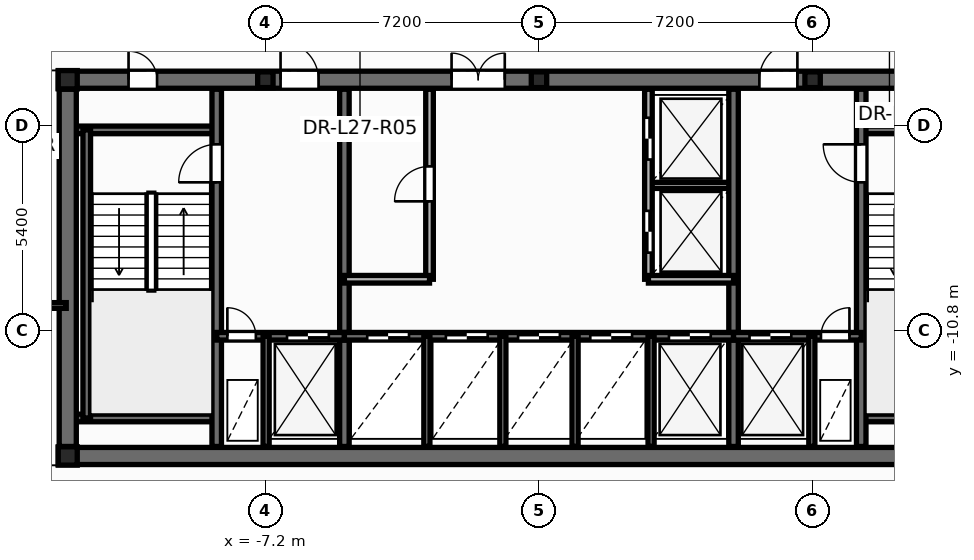
"""IFC4 building model, lengths in metres.
Left out: names, types, materials, properties, quantities, classifications, styles, units other than length and angle.
Written with IfcOpenShell. Run it as: python <this file> out.ifc"""

import sys

from ifc_helpers import new_model, si_unit, direction, frame, frame_2d, origin, origin_2d, place, context, subcontext, project, spatial, rectangle, i_section, extrude, element, fill, save


model = new_model("IFC4")
c1 = context("Model", 3, precision=1e-05, world=origin(), true_north=direction((0.0, 1.0)))
c2 = subcontext(c1, "Body", "Model", "MODEL_VIEW")
j1 = project(units=[si_unit("LENGTHUNIT", "METRE"), si_unit("PLANEANGLEUNIT", "RADIAN")], contexts=[c1])
p1 = place(None, origin())
s1 = spatial("IfcSite", under=j1, at=p1, CompositionType="ELEMENT")
p2 = place(p1, origin())
s2 = spatial("IfcBuilding", under=s1, at=p2, CompositionType="ELEMENT")
p3 = place(p2, frame((0.0, 0.0, 106.8)))
s3 = spatial("IfcBuildingStorey", under=s2, at=p3, CompositionType="ELEMENT", Elevation=106.8)
for number, where, z_axis, x_axis in (
    (1, (-12.4, -14.1, 0.0), (0.0, 0.0, 1.0), (1.0, 0.0, 0.0)),
    (2, (-12.4, -4.2, 0.0), (0.0, 0.0, 1.0), (1.0, 0.0, 0.0)),
):
    element("IfcColumn", number, at=place(p3, frame(where, z_axis=z_axis, x_axis=x_axis)), inside=s3, PredefinedType="COLUMN", context=c2, shape_type="SweptSolid", body=[
        extrude(i_section(OverallWidth=0.5, OverallDepth=0.482, WebThickness=0.04, FlangeThickness=0.045, at=origin_2d()), origin(), (0.0, 0.0, 1.0), 3.6),
    ])
for number, where, z_axis, x_axis in (
    (3, (-7.2, -4.2, 0.0), (0.0, 0.0, 1.0), (1.0, 0.0, 0.0)),
    (4, (0.0, -4.2, 0.0), (0.0, 0.0, 1.0), (1.0, 0.0, 0.0)),
    (5, (7.2, -4.2, 0.0), (0.0, 0.0, 1.0), (1.0, 0.0, 0.0)),
):
    element("IfcColumn", number, at=place(p3, frame(where, z_axis=z_axis, x_axis=x_axis)), inside=s3, PredefinedType="PILASTER", context=c2, shape_type="SweptSolid", body=[
        extrude(i_section(OverallWidth=0.405, OverallDepth=0.414, WebThickness=0.022, FlangeThickness=0.032, at=origin_2d()), origin(), (0.0, 0.0, 1.0), 3.6),
    ])
p4 = place(p3, frame((2.88, -6.98, 0.0), z_axis=(0.0, 0.0, 1.0), x_axis=(1.0, 0.0, 0.0)))
e6 = element("IfcWall", 6, at=p4, inside=s3, PredefinedType="PARTITIONING", context=c2, shape_type="SweptSolid", body=[
    extrude(rectangle(XDim=2.24, YDim=0.16, at=frame_2d((1.12, 0.0))), origin(), (0.0, 0.0, 1.0), 3.35),
])
p5 = place(p3, frame((-12.65, -14.1, 0.0), z_axis=(0.0, 0.0, 1.0), x_axis=(1.0, 0.0, 0.0)))
e7 = element("IfcWall", 7, at=p5, inside=s3, PredefinedType="SHEAR", context=c2, shape_type="SweptSolid", body=[
    extrude(rectangle(XDim=25.3, YDim=0.45, at=frame_2d((12.65, 0.0))), origin(), (0.0, 0.0, 1.0), 3.6),
])
p6 = place(p3, frame((-12.65, -4.2, 0.0), z_axis=(0.0, 0.0, 1.0), x_axis=(1.0, 0.0, 0.0)))
e8 = element("IfcWall", 8, at=p6, inside=s3, PredefinedType="SHEAR", context=c2, shape_type="SweptSolid", body=[
    extrude(rectangle(XDim=25.3, YDim=0.45, at=frame_2d((12.65, 0.0))), origin(), (0.0, 0.0, 1.0), 3.6),
])
p7 = place(p6, frame((1.85, 0.0, 0.0)))
e9 = element("IfcOpeningElement", 9, at=p7, cuts=e8, PredefinedType="OPENING", context=c2, shape_type="SweptSolid", body=[
    extrude(rectangle(XDim=0.756, YDim=2.054, at=frame_2d((0.375, 1.027))), frame((0.0, 0.235, 0.0), z_axis=(0.0, -1.0, 0.0), x_axis=(1.0, 0.0, 0.0)), (0.0, 0.0, 1.0), 0.47),
])
p8 = place(p6, frame((22.65, 0.0, 0.0)))
e10 = element("IfcOpeningElement", 10, at=p8, cuts=e8, PredefinedType="OPENING", context=c2, shape_type="SweptSolid", body=[
    extrude(rectangle(XDim=0.756, YDim=2.054, at=frame_2d((0.375, 1.027))), frame((0.0, 0.235, 0.0), z_axis=(0.0, -1.0, 0.0), x_axis=(1.0, 0.0, 0.0)), (0.0, 0.0, 1.0), 0.47),
])
p9 = place(p6, frame((5.85, 0.0, 0.0)))
e11 = element("IfcOpeningElement", 11, at=p9, cuts=e8, PredefinedType="OPENING", context=c2, shape_type="SweptSolid", body=[
    extrude(rectangle(XDim=1.006, YDim=2.104, at=frame_2d((0.5, 1.052))), frame((0.0, 0.235, 0.0), z_axis=(0.0, -1.0, 0.0), x_axis=(1.0, 0.0, 0.0)), (0.0, 0.0, 1.0), 0.47),
])
p10 = place(p6, frame((10.35, 0.0, 0.0)))
e12 = element("IfcOpeningElement", 12, at=p10, cuts=e8, PredefinedType="OPENING", context=c2, shape_type="SweptSolid", body=[
    extrude(rectangle(XDim=1.406, YDim=2.154, at=frame_2d((0.7, 1.077))), frame((0.0, 0.235, 0.0), z_axis=(0.0, -1.0, 0.0), x_axis=(1.0, 0.0, 0.0)), (0.0, 0.0, 1.0), 0.47),
])
p11 = place(p6, frame((18.45, 0.0, 0.0)))
e13 = element("IfcOpeningElement", 13, at=p11, cuts=e8, PredefinedType="OPENING", context=c2, shape_type="SweptSolid", body=[
    extrude(rectangle(XDim=1.006, YDim=2.104, at=frame_2d((0.5, 1.052))), frame((0.0, 0.235, 0.0), z_axis=(0.0, -1.0, 0.0), x_axis=(1.0, 0.0, 0.0)), (0.0, 0.0, 1.0), 0.47),
])
for number, where, z_axis, x_axis in (
    (14, (-12.35, -5.52, 0.0), (0.0, 0.0, 1.0), (1.0, 0.0, 0.0)),
    (15, (-12.35, -13.1, 0.0), (0.0, 0.0, 1.0), (1.0, 0.0, 0.0)),
):
    element("IfcWall", number, at=place(p3, frame(where, z_axis=z_axis, x_axis=x_axis)), inside=s3, PredefinedType="SOLIDWALL", context=c2, shape_type="SweptSolid", body=[
        extrude(rectangle(XDim=3.87, YDim=0.2, at=frame_2d((1.935, 0.0))), origin(), (0.0, 0.0, 1.0), 3.6),
    ])
p12 = place(p3, frame((-11.9, -13.1, 0.0), z_axis=(0.0, 0.0, 1.0), x_axis=(0.0, 1.0, 0.0)))
e16 = element("IfcWall", 16, at=p12, inside=s3, PredefinedType="SOLIDWALL", context=c2, shape_type="SweptSolid", body=[
    extrude(rectangle(XDim=7.58, YDim=0.2, at=frame_2d((3.79, 0.0))), origin(), (0.0, 0.0, 1.0), 3.6),
])
for number, where, z_axis, x_axis in (
    (17, (8.48, -5.52, 0.0), (0.0, 0.0, 1.0), (1.0, 0.0, 0.0)),
    (18, (8.48, -13.1, 0.0), (0.0, 0.0, 1.0), (1.0, 0.0, 0.0)),
):
    element("IfcWall", number, at=place(p3, frame(where, z_axis=z_axis, x_axis=x_axis)), inside=s3, PredefinedType="SOLIDWALL", context=c2, shape_type="SweptSolid", body=[
        extrude(rectangle(XDim=3.87, YDim=0.2, at=frame_2d((1.935, 0.0))), origin(), (0.0, 0.0, 1.0), 3.6),
    ])
p13 = place(p3, frame((-8.48, -13.85, 0.0), z_axis=(0.0, 0.0, 1.0), x_axis=(0.0, 1.0, 0.0)))
e19 = element("IfcWall", 19, at=p13, inside=s3, PredefinedType="SHEAR", context=c2, shape_type="SweptSolid", body=[
    extrude(rectangle(XDim=9.4, YDim=0.25, at=frame_2d((4.7, 0.0))), origin(), (0.0, 0.0, 1.0), 3.6),
])
p14 = place(p13, frame((6.95, 0.0, 0.0)))
e20 = element("IfcOpeningElement", 20, at=p14, cuts=e19, PredefinedType="OPENING", context=c2, shape_type="SweptSolid", body=[
    extrude(rectangle(XDim=1.006, YDim=2.104, at=frame_2d((0.5, 1.052))), frame((0.0, 0.135, 0.0), z_axis=(0.0, -1.0, 0.0), x_axis=(1.0, 0.0, 0.0)), (0.0, 0.0, 1.0), 0.27),
])
p15 = place(p3, frame((8.48, -13.85, 0.0), z_axis=(0.0, 0.0, 1.0), x_axis=(0.0, 1.0, 0.0)))
e21 = element("IfcWall", 21, at=p15, inside=s3, PredefinedType="SHEAR", context=c2, shape_type="SweptSolid", body=[
    extrude(rectangle(XDim=9.4, YDim=0.25, at=frame_2d((4.7, 0.0))), origin(), (0.0, 0.0, 1.0), 3.6),
])
p16 = place(p15, frame((6.95, 0.0, 0.0)))
e22 = element("IfcOpeningElement", 22, at=p16, cuts=e21, PredefinedType="OPENING", context=c2, shape_type="SweptSolid", body=[
    extrude(rectangle(XDim=1.006, YDim=2.104, at=frame_2d((0.5, 1.052))), frame((0.0, 0.135, 0.0), z_axis=(0.0, -1.0, 0.0), x_axis=(1.0, 0.0, 0.0)), (0.0, 0.0, 1.0), 0.27),
])
for number, where, z_axis, x_axis in (
    (23, (-5.12, -13.85, 0.0), (0.0, 0.0, 1.0), (0.0, 1.0, 0.0)),
    (24, (5.12, -13.85, 0.0), (0.0, 0.0, 1.0), (0.0, 1.0, 0.0)),
):
    element("IfcWall", number, at=place(p3, frame(where, z_axis=z_axis, x_axis=x_axis)), inside=s3, PredefinedType="SHEAR", context=c2, shape_type="SweptSolid", body=[
        extrude(rectangle(XDim=9.4, YDim=0.25, at=frame_2d((4.7, 0.0))), origin(), (0.0, 0.0, 1.0), 3.6),
    ])
p17 = place(p3, frame((-8.48, -10.95, 0.0), z_axis=(0.0, 0.0, 1.0), x_axis=(1.0, 0.0, 0.0)))
e25 = element("IfcWall", 25, at=p17, inside=s3, PredefinedType="SOLIDWALL", context=c2, shape_type="SweptSolid", body=[
    extrude(rectangle(XDim=3.36, YDim=0.2, at=frame_2d((1.68, 0.0))), origin(), (0.0, 0.0, 1.0), 3.6),
])
p18 = place(p17, frame((0.28, 0.0, 0.0)))
e26 = element("IfcOpeningElement", 26, at=p18, cuts=e25, PredefinedType="OPENING", context=c2, shape_type="SweptSolid", body=[
    extrude(rectangle(XDim=0.756, YDim=2.054, at=frame_2d((0.375, 1.027))), frame((0.0, 0.11, 0.0), z_axis=(0.0, -1.0, 0.0), x_axis=(1.0, 0.0, 0.0)), (0.0, 0.0, 1.0), 0.22),
])
p19 = place(p17, frame((1.85, 0.0, 0.0)))
e27 = element("IfcOpeningElement", 27, at=p19, cuts=e25, PredefinedType="OPENING", context=c2, shape_type="SweptSolid", body=[
    extrude(rectangle(XDim=1.106, YDim=2.104, at=frame_2d((0.55, 1.052))), frame((0.0, 0.11, 0.0), z_axis=(0.0, -1.0, 0.0), x_axis=(1.0, 0.0, 0.0)), (0.0, 0.0, 1.0), 0.22),
])
p20 = place(p3, frame((-5.12, -10.95, 0.0), z_axis=(0.0, 0.0, 1.0), x_axis=(1.0, 0.0, 0.0)))
e28 = element("IfcWall", 28, at=p20, inside=s3, PredefinedType="SOLIDWALL", context=c2, shape_type="SweptSolid", body=[
    extrude(rectangle(XDim=10.24, YDim=0.2, at=frame_2d((5.12, 0.0))), origin(), (0.0, 0.0, 1.0), 3.6),
])
p21 = place(p20, frame((0.6, 0.0, 0.0)))
e29 = element("IfcOpeningElement", 29, at=p21, cuts=e28, PredefinedType="OPENING", context=c2, shape_type="SweptSolid", body=[
    extrude(rectangle(XDim=1.106, YDim=2.104, at=frame_2d((0.55, 1.052))), frame((0.0, 0.11, 0.0), z_axis=(0.0, -1.0, 0.0), x_axis=(1.0, 0.0, 0.0)), (0.0, 0.0, 1.0), 0.22),
])
p22 = place(p20, frame((2.67, 0.0, 0.0)))
e30 = element("IfcOpeningElement", 30, at=p22, cuts=e28, PredefinedType="OPENING", context=c2, shape_type="SweptSolid", body=[
    extrude(rectangle(XDim=1.106, YDim=2.104, at=frame_2d((0.55, 1.052))), frame((0.0, 0.11, 0.0), z_axis=(0.0, -1.0, 0.0), x_axis=(1.0, 0.0, 0.0)), (0.0, 0.0, 1.0), 0.22),
])
p23 = place(p20, frame((4.57, 0.0, 0.0)))
e31 = element("IfcOpeningElement", 31, at=p23, cuts=e28, PredefinedType="OPENING", context=c2, shape_type="SweptSolid", body=[
    extrude(rectangle(XDim=1.106, YDim=2.104, at=frame_2d((0.55, 1.052))), frame((0.0, 0.11, 0.0), z_axis=(0.0, -1.0, 0.0), x_axis=(1.0, 0.0, 0.0)), (0.0, 0.0, 1.0), 0.22),
])
p24 = place(p20, frame((6.47, 0.0, 0.0)))
e32 = element("IfcOpeningElement", 32, at=p24, cuts=e28, PredefinedType="OPENING", context=c2, shape_type="SweptSolid", body=[
    extrude(rectangle(XDim=1.106, YDim=2.104, at=frame_2d((0.55, 1.052))), frame((0.0, 0.11, 0.0), z_axis=(0.0, -1.0, 0.0), x_axis=(1.0, 0.0, 0.0)), (0.0, 0.0, 1.0), 0.22),
])
p25 = place(p20, frame((8.54, 0.0, 0.0)))
e33 = element("IfcOpeningElement", 33, at=p25, cuts=e28, PredefinedType="OPENING", context=c2, shape_type="SweptSolid", body=[
    extrude(rectangle(XDim=1.106, YDim=2.104, at=frame_2d((0.55, 1.052))), frame((0.0, 0.11, 0.0), z_axis=(0.0, -1.0, 0.0), x_axis=(1.0, 0.0, 0.0)), (0.0, 0.0, 1.0), 0.22),
])
p26 = place(p3, frame((5.12, -10.95, 0.0), z_axis=(0.0, 0.0, 1.0), x_axis=(1.0, 0.0, 0.0)))
e34 = element("IfcWall", 34, at=p26, inside=s3, PredefinedType="SOLIDWALL", context=c2, shape_type="SweptSolid", body=[
    extrude(rectangle(XDim=3.36, YDim=0.2, at=frame_2d((1.68, 0.0))), origin(), (0.0, 0.0, 1.0), 3.6),
])
p27 = place(p26, frame((0.42, 0.0, 0.0)))
e35 = element("IfcOpeningElement", 35, at=p27, cuts=e34, PredefinedType="OPENING", context=c2, shape_type="SweptSolid", body=[
    extrude(rectangle(XDim=1.106, YDim=2.104, at=frame_2d((0.55, 1.052))), frame((0.0, 0.11, 0.0), z_axis=(0.0, -1.0, 0.0), x_axis=(1.0, 0.0, 0.0)), (0.0, 0.0, 1.0), 0.22),
])
p28 = place(p26, frame((2.3, 0.0, 0.0)))
e36 = element("IfcOpeningElement", 36, at=p28, cuts=e34, PredefinedType="OPENING", context=c2, shape_type="SweptSolid", body=[
    extrude(rectangle(XDim=0.756, YDim=2.054, at=frame_2d((0.375, 1.027))), frame((0.0, 0.11, 0.0), z_axis=(0.0, -1.0, 0.0), x_axis=(1.0, 0.0, 0.0)), (0.0, 0.0, 1.0), 0.22),
])
for number, where, z_axis, x_axis in (
    (37, (-7.18, -13.85, 0.0), (0.0, 0.0, 1.0), (0.0, 1.0, 0.0)),
    (38, (7.18, -13.85, 0.0), (0.0, 0.0, 1.0), (0.0, 1.0, 0.0)),
    (39, (-2.95, -13.85, 0.0), (0.0, 0.0, 1.0), (0.0, 1.0, 0.0)),
    (40, (2.95, -13.85, 0.0), (0.0, 0.0, 1.0), (0.0, 1.0, 0.0)),
):
    element("IfcWall", number, at=place(p3, frame(where, z_axis=z_axis, x_axis=x_axis)), inside=s3, PredefinedType="PARTITIONING", context=c2, shape_type="SweptSolid", body=[
        extrude(rectangle(XDim=2.9, YDim=0.16, at=frame_2d((1.45, 0.0))), origin(), (0.0, 0.0, 1.0), 2.375),
    ])
p29 = place(p3, frame((-12.4, -13.85, 0.0), z_axis=(0.0, 0.0, 1.0), x_axis=(0.0, 1.0, 0.0)))
e41 = element("IfcWall", 41, at=p29, inside=s3, PredefinedType="SHEAR", context=c2, shape_type="SweptSolid", body=[
    extrude(rectangle(XDim=9.4, YDim=0.45, at=frame_2d((4.7, 0.0))), origin(), (0.0, 0.0, 1.0), 3.6),
])
p30 = place(p3, frame((-2.88, -9.45, 0.0), z_axis=(0.0, 0.0, 1.0), x_axis=(0.0, 1.0, 0.0)))
e42 = element("IfcWall", 42, at=p30, inside=s3, PredefinedType="SOLIDWALL", context=c2, shape_type="SweptSolid", body=[
    extrude(rectangle(XDim=5.0, YDim=0.2, at=frame_2d((2.5, 0.0))), origin(), (0.0, 0.0, 1.0), 3.35),
])
p31 = place(p30, frame((2.05, 0.0, 0.0)))
e43 = element("IfcOpeningElement", 43, at=p31, cuts=e42, PredefinedType="OPENING", context=c2, shape_type="SweptSolid", body=[
    extrude(rectangle(XDim=0.926, YDim=2.104, at=frame_2d((0.46, 1.052))), frame((0.0, 0.11, 0.0), z_axis=(0.0, -1.0, 0.0), x_axis=(1.0, 0.0, 0.0)), (0.0, 0.0, 1.0), 0.22),
])
p32 = place(p3, frame((-5.12, -9.45, 0.0), z_axis=(0.0, 0.0, 1.0), x_axis=(1.0, 0.0, 0.0)))
e44 = element("IfcWall", 44, at=p32, inside=s3, PredefinedType="SOLIDWALL", context=c2, shape_type="SweptSolid", body=[
    extrude(rectangle(XDim=2.24, YDim=0.2, at=frame_2d((1.12, 0.0))), origin(), (0.0, 0.0, 1.0), 3.35),
])
p33 = place(p3, frame((2.88, -9.45, 0.0), z_axis=(0.0, 0.0, 1.0), x_axis=(0.0, 1.0, 0.0)))
e45 = element("IfcWall", 45, at=p33, inside=s3, PredefinedType="SOLIDWALL", context=c2, shape_type="SweptSolid", body=[
    extrude(rectangle(XDim=5.0, YDim=0.2, at=frame_2d((2.5, 0.0))), origin(), (0.0, 0.0, 1.0), 3.35),
])
p34 = place(p33, frame((0.7, 0.0, 0.0)))
e46 = element("IfcOpeningElement", 46, at=p34, cuts=e45, PredefinedType="OPENING", context=c2, shape_type="SweptSolid", body=[
    extrude(rectangle(XDim=1.106, YDim=2.104, at=frame_2d((0.55, 1.052))), frame((0.0, 0.11, 0.0), z_axis=(0.0, -1.0, 0.0), x_axis=(1.0, 0.0, 0.0)), (0.0, 0.0, 1.0), 0.22),
])
p35 = place(p33, frame((3.15, 0.0, 0.0)))
e47 = element("IfcOpeningElement", 47, at=p35, cuts=e45, PredefinedType="OPENING", context=c2, shape_type="SweptSolid", body=[
    extrude(rectangle(XDim=1.106, YDim=2.104, at=frame_2d((0.55, 1.052))), frame((0.0, 0.11, 0.0), z_axis=(0.0, -1.0, 0.0), x_axis=(1.0, 0.0, 0.0)), (0.0, 0.0, 1.0), 0.22),
])
p36 = place(p3, frame((2.88, -9.45, 0.0), z_axis=(0.0, 0.0, 1.0), x_axis=(1.0, 0.0, 0.0)))
e48 = element("IfcWall", 48, at=p36, inside=s3, PredefinedType="SOLIDWALL", context=c2, shape_type="SweptSolid", body=[
    extrude(rectangle(XDim=2.24, YDim=0.2, at=frame_2d((1.12, 0.0))), origin(), (0.0, 0.0, 1.0), 3.35),
])
for number, where, z_axis, x_axis in (
    (49, (-0.95, -13.85, 0.0), (0.0, 0.0, 1.0), (0.0, 1.0, 0.0)),
    (50, (0.95, -13.85, 0.0), (0.0, 0.0, 1.0), (0.0, 1.0, 0.0)),
):
    element("IfcWall", number, at=place(p3, frame(where, z_axis=z_axis, x_axis=x_axis)), inside=s3, PredefinedType="PARTITIONING", context=c2, shape_type="SweptSolid", body=[
        extrude(rectangle(XDim=2.9, YDim=0.16, at=frame_2d((1.45, 0.0))), origin(), (0.0, 0.0, 1.0), 2.375),
    ])
p37 = place(p3, frame((-21.822, -10.14, 0.0), z_axis=(0.0, 0.0, 1.0), x_axis=(1.0, 0.0, 0.0)))
e51 = element("IfcWall", 51, at=p37, inside=s3, PredefinedType="PARTITIONING", context=c2, shape_type="SweptSolid", body=[
    extrude(rectangle(XDim=9.382, YDim=0.15, at=frame_2d((4.691, 0.0))), origin(), (0.0, 0.0, 1.0), 2.713),
])
p38 = place(p37, frame((2.17, 0.0, 0.0)))
e52 = element("IfcOpeningElement", 52, at=p38, cuts=e51, PredefinedType="OPENING", context=c2, shape_type="SweptSolid", body=[
    extrude(rectangle(XDim=0.906, YDim=2.104, at=frame_2d((0.45, 1.052))), frame((0.0, 0.085, 0.0), z_axis=(0.0, -1.0, 0.0), x_axis=(1.0, 0.0, 0.0)), (0.0, 0.0, 1.0), 0.17),
])
p39 = place(p31, origin())
e53 = element("IfcDoor", 53, at=p39, inside=s3, OperationType="SINGLE_SWING_LEFT", PredefinedType="DOOR", context=c2, shape_type="SweptSolid", body=[
    extrude(rectangle(XDim=0.92, YDim=2.1, at=frame_2d((0.46, 1.05))), frame((0.0, 0.025, 0.0), z_axis=(0.0, -1.0, 0.0), x_axis=(1.0, 0.0, 0.0)), (0.0, 0.0, 1.0), 0.05),
])
fill(e43, e53)
p40 = place(p34, origin())
e54 = element("IfcDoor", 54, at=p40, inside=s3, OperationType="DOUBLE_DOOR_SLIDING", PredefinedType="DOOR", context=c2, shape_type="SweptSolid", body=[
    extrude(rectangle(XDim=1.1, YDim=2.1, at=frame_2d((0.55, 1.05))), frame((0.0, 0.025, 0.0), z_axis=(0.0, -1.0, 0.0), x_axis=(1.0, 0.0, 0.0)), (0.0, 0.0, 1.0), 0.05),
])
fill(e46, e54)
p41 = place(p35, origin())
e55 = element("IfcDoor", 55, at=p41, inside=s3, OperationType="DOUBLE_DOOR_SLIDING", PredefinedType="DOOR", context=c2, shape_type="SweptSolid", body=[
    extrude(rectangle(XDim=1.1, YDim=2.1, at=frame_2d((0.55, 1.05))), frame((0.0, 0.025, 0.0), z_axis=(0.0, -1.0, 0.0), x_axis=(1.0, 0.0, 0.0)), (0.0, 0.0, 1.0), 0.05),
])
fill(e47, e55)
p42 = place(p14, origin())
e56 = element("IfcDoor", 56, at=p42, inside=s3, OperationType="SINGLE_SWING_LEFT", PredefinedType="DOOR", context=c2, shape_type="SweptSolid", body=[
    extrude(rectangle(XDim=1.0, YDim=2.1, at=frame_2d((0.5, 1.05))), frame((0.0, 0.025, 0.0), z_axis=(0.0, -1.0, 0.0), x_axis=(1.0, 0.0, 0.0)), (0.0, 0.0, 1.0), 0.05),
])
fill(e20, e56)
p43 = place(p16, origin())
e57 = element("IfcDoor", 57, at=p43, inside=s3, OperationType="SINGLE_SWING_RIGHT", PredefinedType="DOOR", context=c2, shape_type="SweptSolid", body=[
    extrude(rectangle(XDim=1.0, YDim=2.1, at=frame_2d((0.5, 1.05))), frame((0.0, 0.025, 0.0), z_axis=(0.0, -1.0, 0.0), x_axis=(1.0, 0.0, 0.0)), (0.0, 0.0, 1.0), 0.05),
])
fill(e22, e57)
p44 = place(p18, origin())
e58 = element("IfcDoor", 58, at=p44, inside=s3, OperationType="SINGLE_SWING_LEFT", PredefinedType="DOOR", context=c2, shape_type="SweptSolid", body=[
    extrude(rectangle(XDim=0.75, YDim=2.05, at=frame_2d((0.375, 1.025))), frame((0.0, 0.025, 0.0), z_axis=(0.0, -1.0, 0.0), x_axis=(1.0, 0.0, 0.0)), (0.0, 0.0, 1.0), 0.05),
])
fill(e26, e58)
p45 = place(p19, origin())
e59 = element("IfcDoor", 59, at=p45, inside=s3, OperationType="DOUBLE_DOOR_SLIDING", PredefinedType="DOOR", context=c2, shape_type="SweptSolid", body=[
    extrude(rectangle(XDim=1.1, YDim=2.1, at=frame_2d((0.55, 1.05))), frame((0.0, 0.025, 0.0), z_axis=(0.0, -1.0, 0.0), x_axis=(1.0, 0.0, 0.0)), (0.0, 0.0, 1.0), 0.05),
])
fill(e27, e59)
p46 = place(p27, origin())
e60 = element("IfcDoor", 60, at=p46, inside=s3, OperationType="DOUBLE_DOOR_SLIDING", PredefinedType="DOOR", context=c2, shape_type="SweptSolid", body=[
    extrude(rectangle(XDim=1.1, YDim=2.1, at=frame_2d((0.55, 1.05))), frame((0.0, 0.025, 0.0), z_axis=(0.0, -1.0, 0.0), x_axis=(1.0, 0.0, 0.0)), (0.0, 0.0, 1.0), 0.05),
])
fill(e35, e60)
p47 = place(p28, origin())
e61 = element("IfcDoor", 61, at=p47, inside=s3, OperationType="SINGLE_SWING_RIGHT", PredefinedType="DOOR", context=c2, shape_type="SweptSolid", body=[
    extrude(rectangle(XDim=0.75, YDim=2.05, at=frame_2d((0.375, 1.025))), frame((0.0, 0.025, 0.0), z_axis=(0.0, -1.0, 0.0), x_axis=(1.0, 0.0, 0.0)), (0.0, 0.0, 1.0), 0.05),
])
fill(e36, e61)
p48 = place(p21, origin())
e62 = element("IfcDoor", 62, at=p48, inside=s3, OperationType="DOUBLE_DOOR_SLIDING", PredefinedType="DOOR", context=c2, shape_type="SweptSolid", body=[
    extrude(rectangle(XDim=1.1, YDim=2.1, at=frame_2d((0.55, 1.05))), frame((0.0, 0.025, 0.0), z_axis=(0.0, -1.0, 0.0), x_axis=(1.0, 0.0, 0.0)), (0.0, 0.0, 1.0), 0.05),
])
fill(e29, e62)
p49 = place(p22, origin())
e63 = element("IfcDoor", 63, at=p49, inside=s3, OperationType="DOUBLE_DOOR_SLIDING", PredefinedType="DOOR", context=c2, shape_type="SweptSolid", body=[
    extrude(rectangle(XDim=1.1, YDim=2.1, at=frame_2d((0.55, 1.05))), frame((0.0, 0.025, 0.0), z_axis=(0.0, -1.0, 0.0), x_axis=(1.0, 0.0, 0.0)), (0.0, 0.0, 1.0), 0.05),
])
fill(e30, e63)
p50 = place(p23, origin())
e64 = element("IfcDoor", 64, at=p50, inside=s3, OperationType="DOUBLE_DOOR_SLIDING", PredefinedType="DOOR", context=c2, shape_type="SweptSolid", body=[
    extrude(rectangle(XDim=1.1, YDim=2.1, at=frame_2d((0.55, 1.05))), frame((0.0, 0.025, 0.0), z_axis=(0.0, -1.0, 0.0), x_axis=(1.0, 0.0, 0.0)), (0.0, 0.0, 1.0), 0.05),
])
fill(e31, e64)
p51 = place(p24, origin())
e65 = element("IfcDoor", 65, at=p51, inside=s3, OperationType="DOUBLE_DOOR_SLIDING", PredefinedType="DOOR", context=c2, shape_type="SweptSolid", body=[
    extrude(rectangle(XDim=1.1, YDim=2.1, at=frame_2d((0.55, 1.05))), frame((0.0, 0.025, 0.0), z_axis=(0.0, -1.0, 0.0), x_axis=(1.0, 0.0, 0.0)), (0.0, 0.0, 1.0), 0.05),
])
fill(e32, e65)
p52 = place(p25, origin())
e66 = element("IfcDoor", 66, at=p52, inside=s3, OperationType="DOUBLE_DOOR_SLIDING", PredefinedType="DOOR", context=c2, shape_type="SweptSolid", body=[
    extrude(rectangle(XDim=1.1, YDim=2.1, at=frame_2d((0.55, 1.05))), frame((0.0, 0.025, 0.0), z_axis=(0.0, -1.0, 0.0), x_axis=(1.0, 0.0, 0.0)), (0.0, 0.0, 1.0), 0.05),
])
fill(e33, e66)
p53 = place(p7, origin())
e67 = element("IfcDoor", 67, at=p53, inside=s3, OperationType="SINGLE_SWING_LEFT", PredefinedType="DOOR", context=c2, shape_type="SweptSolid", body=[
    extrude(rectangle(XDim=0.75, YDim=2.05, at=frame_2d((0.375, 1.025))), frame((0.0, 0.025, 0.0), z_axis=(0.0, -1.0, 0.0), x_axis=(1.0, 0.0, 0.0)), (0.0, 0.0, 1.0), 0.05),
])
fill(e9, e67)
p54 = place(p9, origin())
e68 = element("IfcDoor", 68, at=p54, inside=s3, OperationType="SINGLE_SWING_LEFT", PredefinedType="DOOR", context=c2, shape_type="SweptSolid", body=[
    extrude(rectangle(XDim=1.0, YDim=2.1, at=frame_2d((0.5, 1.05))), frame((0.0, 0.025, 0.0), z_axis=(0.0, -1.0, 0.0), x_axis=(1.0, 0.0, 0.0)), (0.0, 0.0, 1.0), 0.05),
])
fill(e11, e68)
p55 = place(p10, origin())
e69 = element("IfcDoor", 69, at=p55, inside=s3, OperationType="DOUBLE_DOOR_SINGLE_SWING", PredefinedType="DOOR", context=c2, shape_type="SweptSolid", body=[
    extrude(rectangle(XDim=1.4, YDim=2.15, at=frame_2d((0.7, 1.075))), frame((0.0, 0.025, 0.0), z_axis=(0.0, -1.0, 0.0), x_axis=(1.0, 0.0, 0.0)), (0.0, 0.0, 1.0), 0.05),
])
fill(e12, e69)
p56 = place(p11, origin())
e70 = element("IfcDoor", 70, at=p56, inside=s3, OperationType="SINGLE_SWING_RIGHT", PredefinedType="DOOR", context=c2, shape_type="SweptSolid", body=[
    extrude(rectangle(XDim=1.0, YDim=2.1, at=frame_2d((0.5, 1.05))), frame((0.0, 0.025, 0.0), z_axis=(0.0, -1.0, 0.0), x_axis=(1.0, 0.0, 0.0)), (0.0, 0.0, 1.0), 0.05),
])
fill(e13, e70)
save(model, sys.argv[1])
